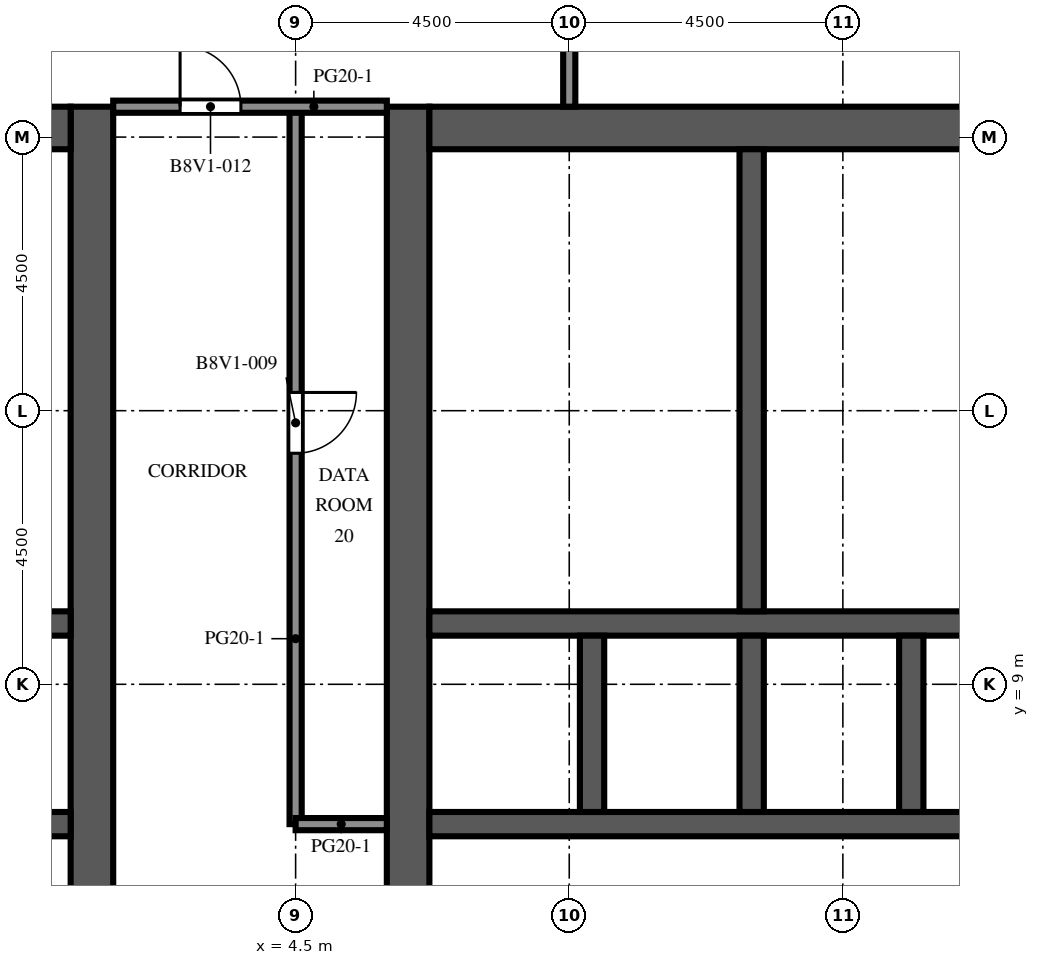
"""IFC4 building model, lengths in metres.
Left out: names, types, materials, properties, quantities, classifications, styles, units other than length and angle.
Written with IfcOpenShell. Run it as: python <this file> out.ifc"""

import sys

from ifc_helpers import new_model, si_unit, direction, frame, frame_2d, origin, place, context, subcontext, project, spatial, rectangle, extrude, element, fill, save


model = new_model("IFC4")
c1 = context("Model", 3, precision=1e-05, world=origin(), true_north=direction((0.0, 1.0)))
c2 = subcontext(c1, "Body", "Model", "MODEL_VIEW")
j1 = project(units=[si_unit("LENGTHUNIT", "METRE"), si_unit("PLANEANGLEUNIT", "RADIAN")], contexts=[c1])
p1 = place(None, origin())
s1 = spatial("IfcSite", under=j1, at=p1, CompositionType="ELEMENT")
p2 = place(p1, origin())
s2 = spatial("IfcBuilding", under=s1, at=p2, CompositionType="ELEMENT")
p3 = place(p2, frame((0.0, 0.0, 278.6)))
s3 = spatial("IfcBuildingStorey", under=s2, at=p3, CompositionType="ELEMENT", Elevation=278.6)
p4 = place(p3, frame((1.15, -9.0, 0.0), z_axis=(0.0, 0.0, 1.0), x_axis=(0.0, 1.0, 0.0)))
e1 = element("IfcWall", 1, at=p4, inside=s3, PredefinedType="SHEAR", context=c2, shape_type="SweptSolid", body=[
    extrude(rectangle(XDim=27.5, YDim=0.7, at=frame_2d((13.75, 0.0))), origin(), (0.0, 0.0, 1.0), 4.1),
])
p5 = place(p4, frame((12.55, 0.0, 0.0)))
e2 = element("IfcOpeningElement", 2, at=p5, cuts=e1, PredefinedType="OPENING", context=c2, shape_type="SweptSolid", body=[
    extrude(rectangle(XDim=2.4, YDim=2.4, at=frame_2d((1.2, 1.2))), frame((0.0, 0.36, 0.0), z_axis=(0.0, -1.0, 0.0), x_axis=(1.0, 0.0, 0.0)), (0.0, 0.0, 1.0), 0.72),
])
p6 = place(p4, frame((3.9, 0.0, 0.0)))
e3 = element("IfcOpeningElement", 3, at=p6, cuts=e1, PredefinedType="OPENING", context=c2, shape_type="SweptSolid", body=[
    extrude(rectangle(XDim=1.2, YDim=2.1, at=frame_2d((0.6, 1.05))), frame((0.0, 0.36, 0.0), z_axis=(0.0, -1.0, 0.0), x_axis=(1.0, 0.0, 0.0)), (0.0, 0.0, 1.0), 0.72),
])
p7 = place(p4, frame((19.46, 0.0, 0.0)))
e4 = element("IfcOpeningElement", 4, at=p7, cuts=e1, PredefinedType="OPENING", context=c2, shape_type="SweptSolid", body=[
    extrude(rectangle(XDim=1.0, YDim=2.1, at=frame_2d((0.5, 1.05))), frame((0.0, 0.36, 0.0), z_axis=(0.0, -1.0, 0.0), x_axis=(1.0, 0.0, 0.0)), (0.0, 0.0, 1.0), 0.72),
])
p8 = place(p4, frame((21.17, 0.0, 0.0)))
e5 = element("IfcOpeningElement", 5, at=p8, cuts=e1, PredefinedType="OPENING", context=c2, shape_type="SweptSolid", body=[
    extrude(rectangle(XDim=1.0, YDim=2.1, at=frame_2d((0.5, 1.05))), frame((0.0, 0.36, 0.0), z_axis=(0.0, -1.0, 0.0), x_axis=(1.0, 0.0, 0.0)), (0.0, 0.0, 1.0), 0.72),
])
p9 = place(p4, frame((23.26, 0.0, 0.0)))
e6 = element("IfcOpeningElement", 6, at=p9, cuts=e1, PredefinedType="OPENING", context=c2, shape_type="SweptSolid", body=[
    extrude(rectangle(XDim=1.0, YDim=2.1, at=frame_2d((0.5, 1.05))), frame((0.0, 0.36, 0.0), z_axis=(0.0, -1.0, 0.0), x_axis=(1.0, 0.0, 0.0)), (0.0, 0.0, 1.0), 0.72),
])
p10 = place(p4, frame((25.35, 0.0, 0.0)))
e7 = element("IfcOpeningElement", 7, at=p10, cuts=e1, PredefinedType="OPENING", context=c2, shape_type="SweptSolid", body=[
    extrude(rectangle(XDim=1.0, YDim=2.1, at=frame_2d((0.5, 1.05))), frame((0.0, 0.36, 0.0), z_axis=(0.0, -1.0, 0.0), x_axis=(1.0, 0.0, 0.0)), (0.0, 0.0, 1.0), 0.72),
])
p11 = place(p3, frame((-9.8, 18.15, 0.0), z_axis=(0.0, 0.0, 1.0), x_axis=(1.0, 0.0, 0.0)))
e8 = element("IfcWall", 8, at=p11, inside=s3, PredefinedType="SHEAR", context=c2, shape_type="SweptSolid", body=[
    extrude(rectangle(XDim=10.6, YDim=0.7, at=frame_2d((5.3, 0.0))), origin(), (0.0, 0.0, 1.0), 4.1),
])
p12 = place(p3, frame((-9.8, 6.7, 0.0), z_axis=(0.0, 0.0, 1.0), x_axis=(1.0, 0.0, 0.0)))
e9 = element("IfcWall", 9, at=p12, inside=s3, PredefinedType="SHEAR", context=c2, shape_type="SweptSolid", body=[
    extrude(rectangle(XDim=10.6, YDim=0.4, at=frame_2d((5.3, 0.0))), origin(), (0.0, 0.0, 1.0), 4.1),
])
p13 = place(p12, frame((3.438, 0.0, 0.0)))
e10 = element("IfcOpeningElement", 10, at=p13, cuts=e9, PredefinedType="OPENING", context=c2, shape_type="SweptSolid", body=[
    extrude(rectangle(XDim=1.1, YDim=2.1, at=frame_2d((0.55, 1.05))), frame((0.0, 0.21, 0.0), z_axis=(0.0, -1.0, 0.0), x_axis=(1.0, 0.0, 0.0)), (0.0, 0.0, 1.0), 0.42),
])
p14 = place(p12, frame((6.062, 0.0, 0.0)))
e11 = element("IfcOpeningElement", 11, at=p14, cuts=e9, PredefinedType="OPENING", context=c2, shape_type="SweptSolid", body=[
    extrude(rectangle(XDim=1.1, YDim=2.1, at=frame_2d((0.55, 1.05))), frame((0.0, 0.21, 0.0), z_axis=(0.0, -1.0, 0.0), x_axis=(1.0, 0.0, 0.0)), (0.0, 0.0, 1.0), 0.42),
])
p15 = place(p12, frame((8.812, 0.0, 0.0)))
e12 = element("IfcOpeningElement", 12, at=p15, cuts=e9, PredefinedType="OPENING", context=c2, shape_type="SweptSolid", body=[
    extrude(rectangle(XDim=1.1, YDim=2.1, at=frame_2d((0.55, 1.05))), frame((0.0, 0.21, 0.0), z_axis=(0.0, -1.0, 0.0), x_axis=(1.0, 0.0, 0.0)), (0.0, 0.0, 1.0), 0.42),
])
p16 = place(p12, frame((0.738, 0.0, 0.0)))
e13 = element("IfcOpeningElement", 13, at=p16, cuts=e9, PredefinedType="OPENING", context=c2, shape_type="SweptSolid", body=[
    extrude(rectangle(XDim=1.0, YDim=2.1, at=frame_2d((0.5, 1.05))), frame((0.0, 0.21, 0.0), z_axis=(0.0, -1.0, 0.0), x_axis=(1.0, 0.0, 0.0)), (0.0, 0.0, 1.0), 0.42),
])
p17 = place(p3, frame((-9.8, 10.0, 0.0), z_axis=(0.0, 0.0, 1.0), x_axis=(1.0, 0.0, 0.0)))
e14 = element("IfcWall", 14, at=p17, inside=s3, PredefinedType="SHEAR", context=c2, shape_type="SweptSolid", body=[
    extrude(rectangle(XDim=10.6, YDim=0.4, at=frame_2d((5.3, 0.0))), origin(), (0.0, 0.0, 1.0), 4.1),
])
p18 = place(p3, frame((6.35, -9.0, 0.0), z_axis=(0.0, 0.0, 1.0), x_axis=(0.0, 1.0, 0.0)))
e15 = element("IfcWall", 15, at=p18, inside=s3, PredefinedType="SHEAR", context=c2, shape_type="SweptSolid", body=[
    extrude(rectangle(XDim=27.5, YDim=0.7, at=frame_2d((13.75, 0.0))), origin(), (0.0, 0.0, 1.0), 4.1),
])
p19 = place(p18, frame((12.55, 0.0, 0.0)))
e16 = element("IfcOpeningElement", 16, at=p19, cuts=e15, PredefinedType="OPENING", context=c2, shape_type="SweptSolid", body=[
    extrude(rectangle(XDim=2.4, YDim=2.4, at=frame_2d((1.2, 1.2))), frame((0.0, 0.36, 0.0), z_axis=(0.0, -1.0, 0.0), x_axis=(1.0, 0.0, 0.0)), (0.0, 0.0, 1.0), 0.72),
])
p20 = place(p18, frame((3.9, 0.0, 0.0)))
e17 = element("IfcOpeningElement", 17, at=p20, cuts=e15, PredefinedType="OPENING", context=c2, shape_type="SweptSolid", body=[
    extrude(rectangle(XDim=1.2, YDim=2.1, at=frame_2d((0.6, 1.05))), frame((0.0, 0.36, 0.0), z_axis=(0.0, -1.0, 0.0), x_axis=(1.0, 0.0, 0.0)), (0.0, 0.0, 1.0), 0.72),
])
p21 = place(p18, frame((19.46, 0.0, 0.0)))
e18 = element("IfcOpeningElement", 18, at=p21, cuts=e15, PredefinedType="OPENING", context=c2, shape_type="SweptSolid", body=[
    extrude(rectangle(XDim=1.0, YDim=2.1, at=frame_2d((0.5, 1.05))), frame((0.0, 0.36, 0.0), z_axis=(0.0, -1.0, 0.0), x_axis=(1.0, 0.0, 0.0)), (0.0, 0.0, 1.0), 0.72),
])
p22 = place(p18, frame((21.17, 0.0, 0.0)))
e19 = element("IfcOpeningElement", 19, at=p22, cuts=e15, PredefinedType="OPENING", context=c2, shape_type="SweptSolid", body=[
    extrude(rectangle(XDim=1.0, YDim=2.1, at=frame_2d((0.5, 1.05))), frame((0.0, 0.36, 0.0), z_axis=(0.0, -1.0, 0.0), x_axis=(1.0, 0.0, 0.0)), (0.0, 0.0, 1.0), 0.72),
])
p23 = place(p18, frame((23.26, 0.0, 0.0)))
e20 = element("IfcOpeningElement", 20, at=p23, cuts=e15, PredefinedType="OPENING", context=c2, shape_type="SweptSolid", body=[
    extrude(rectangle(XDim=1.0, YDim=2.1, at=frame_2d((0.5, 1.05))), frame((0.0, 0.36, 0.0), z_axis=(0.0, -1.0, 0.0), x_axis=(1.0, 0.0, 0.0)), (0.0, 0.0, 1.0), 0.72),
])
p24 = place(p18, frame((25.35, 0.0, 0.0)))
e21 = element("IfcOpeningElement", 21, at=p24, cuts=e15, PredefinedType="OPENING", context=c2, shape_type="SweptSolid", body=[
    extrude(rectangle(XDim=1.0, YDim=2.1, at=frame_2d((0.5, 1.05))), frame((0.0, 0.36, 0.0), z_axis=(0.0, -1.0, 0.0), x_axis=(1.0, 0.0, 0.0)), (0.0, 0.0, 1.0), 0.72),
])
p25 = place(p3, frame((6.7, 18.15, 0.0), z_axis=(0.0, 0.0, 1.0), x_axis=(1.0, 0.0, 0.0)))
e22 = element("IfcWall", 22, at=p25, inside=s3, PredefinedType="SHEAR", context=c2, shape_type="SweptSolid", body=[
    extrude(rectangle(XDim=10.6, YDim=0.7, at=frame_2d((5.3, 0.0))), origin(), (0.0, 0.0, 1.0), 4.1),
])
p26 = place(p3, frame((6.7, 6.7, 0.0), z_axis=(0.0, 0.0, 1.0), x_axis=(1.0, 0.0, 0.0)))
e23 = element("IfcWall", 23, at=p26, inside=s3, PredefinedType="SHEAR", context=c2, shape_type="SweptSolid", body=[
    extrude(rectangle(XDim=10.6, YDim=0.4, at=frame_2d((5.3, 0.0))), origin(), (0.0, 0.0, 1.0), 4.1),
])
p27 = place(p26, frame((3.438, 0.0, 0.0)))
e24 = element("IfcOpeningElement", 24, at=p27, cuts=e23, PredefinedType="OPENING", context=c2, shape_type="SweptSolid", body=[
    extrude(rectangle(XDim=1.1, YDim=2.1, at=frame_2d((0.55, 1.05))), frame((0.0, 0.21, 0.0), z_axis=(0.0, -1.0, 0.0), x_axis=(1.0, 0.0, 0.0)), (0.0, 0.0, 1.0), 0.42),
])
p28 = place(p26, frame((6.062, 0.0, 0.0)))
e25 = element("IfcOpeningElement", 25, at=p28, cuts=e23, PredefinedType="OPENING", context=c2, shape_type="SweptSolid", body=[
    extrude(rectangle(XDim=1.1, YDim=2.1, at=frame_2d((0.55, 1.05))), frame((0.0, 0.21, 0.0), z_axis=(0.0, -1.0, 0.0), x_axis=(1.0, 0.0, 0.0)), (0.0, 0.0, 1.0), 0.42),
])
p29 = place(p26, frame((8.812, 0.0, 0.0)))
e26 = element("IfcOpeningElement", 26, at=p29, cuts=e23, PredefinedType="OPENING", context=c2, shape_type="SweptSolid", body=[
    extrude(rectangle(XDim=1.1, YDim=2.1, at=frame_2d((0.55, 1.05))), frame((0.0, 0.21, 0.0), z_axis=(0.0, -1.0, 0.0), x_axis=(1.0, 0.0, 0.0)), (0.0, 0.0, 1.0), 0.42),
])
p30 = place(p26, frame((0.738, 0.0, 0.0)))
e27 = element("IfcOpeningElement", 27, at=p30, cuts=e23, PredefinedType="OPENING", context=c2, shape_type="SweptSolid", body=[
    extrude(rectangle(XDim=1.0, YDim=2.1, at=frame_2d((0.5, 1.05))), frame((0.0, 0.21, 0.0), z_axis=(0.0, -1.0, 0.0), x_axis=(1.0, 0.0, 0.0)), (0.0, 0.0, 1.0), 0.42),
])
p31 = place(p3, frame((6.7, 10.0, 0.0), z_axis=(0.0, 0.0, 1.0), x_axis=(1.0, 0.0, 0.0)))
e28 = element("IfcWall", 28, at=p31, inside=s3, PredefinedType="SHEAR", context=c2, shape_type="SweptSolid", body=[
    extrude(rectangle(XDim=10.6, YDim=0.4, at=frame_2d((5.3, 0.0))), origin(), (0.0, 0.0, 1.0), 4.1),
])
for number, where, z_axis, x_axis in (
    (29, (9.375, 6.9, 0.0), (0.0, 0.0, 1.0), (0.0, 1.0, 0.0)),
    (30, (12.0, 6.9, 0.0), (0.0, 0.0, 1.0), (0.0, 1.0, 0.0)),
    (31, (14.625, 6.9, 0.0), (0.0, 0.0, 1.0), (0.0, 1.0, 0.0)),
):
    element("IfcWall", number, at=place(p3, frame(where, z_axis=z_axis, x_axis=x_axis)), inside=s3, PredefinedType="SHEAR", context=c2, shape_type="SweptSolid", body=[
        extrude(rectangle(XDim=2.9, YDim=0.4, at=frame_2d((1.45, 0.0))), origin(), (0.0, 0.0, 1.0), 4.1),
    ])
p32 = place(p3, frame((12.0, 10.2, 0.0), z_axis=(0.0, 0.0, 1.0), x_axis=(0.0, 1.0, 0.0)))
e32 = element("IfcWall", 32, at=p32, inside=s3, PredefinedType="SHEAR", context=c2, shape_type="SweptSolid", body=[
    extrude(rectangle(XDim=7.6, YDim=0.4, at=frame_2d((3.8, 0.0))), origin(), (0.0, 0.0, 1.0), 4.1),
])
for number, where, z_axis, x_axis in (
    (33, (-4.3, 11.72, 0.0), (0.0, 0.0, 1.0), (1.0, 0.0, 0.0)),
    (34, (-4.3, 13.62, 0.0), (0.0, 0.0, 1.0), (1.0, 0.0, 0.0)),
    (35, (-4.3, 15.9, 0.0), (0.0, 0.0, 1.0), (1.0, 0.0, 0.0)),
    (36, (6.7, 11.72, 0.0), (0.0, 0.0, 1.0), (1.0, 0.0, 0.0)),
    (37, (6.7, 13.62, 0.0), (0.0, 0.0, 1.0), (1.0, 0.0, 0.0)),
    (38, (6.7, 15.9, 0.0), (0.0, 0.0, 1.0), (1.0, 0.0, 0.0)),
):
    element("IfcWall", number, at=place(p3, frame(where, z_axis=z_axis, x_axis=x_axis)), inside=s3, PredefinedType="PARTITIONING", context=c2, shape_type="SweptSolid", body=[
        extrude(rectangle(XDim=5.1, YDim=0.1, at=frame_2d((2.55, 0.0))), origin(), (0.0, 0.0, 1.0), 3.65),
    ])
p33 = place(p3, frame((4.5, 18.5, 0.0), z_axis=(0.0, 0.0, 1.0), x_axis=(0.0, -1.0, 0.0)))
e39 = element("IfcWall", 39, at=p33, inside=s3, PredefinedType="PARTITIONING", context=c2, shape_type="SweptSolid", body=[
    extrude(rectangle(XDim=11.8, YDim=0.2, at=frame_2d((5.9, 0.0))), origin(), (0.0, 0.0, 1.0), 3.65),
])
p34 = place(p33, frame((4.7, 0.0, 0.0)))
e40 = element("IfcOpeningElement", 40, at=p34, cuts=e39, PredefinedType="OPENING", context=c2, shape_type="SweptSolid", body=[
    extrude(rectangle(XDim=1.0, YDim=2.1, at=frame_2d((0.5, 1.05))), frame((0.0, 0.11, 0.0), z_axis=(0.0, -1.0, 0.0), x_axis=(1.0, 0.0, 0.0)), (0.0, 0.0, 1.0), 0.22),
])
p35 = place(p3, frame((9.0, 18.5, 0.0), z_axis=(0.0, 0.0, 1.0), x_axis=(0.0, 1.0, 0.0)))
e41 = element("IfcWall", 41, at=p35, inside=s3, PredefinedType="PARTITIONING", context=c2, shape_type="SweptSolid", body=[
    extrude(rectangle(XDim=3.5, YDim=0.2, at=frame_2d((1.75, 0.0))), origin(), (0.0, 0.0, 1.0), 3.65),
])
p36 = place(p3, frame((4.5, 6.7, 0.0), z_axis=(0.0, 0.0, 1.0), x_axis=(1.0, 0.0, 0.0)))
e42 = element("IfcWall", 42, at=p36, inside=s3, PredefinedType="PARTITIONING", context=c2, shape_type="SweptSolid", body=[
    extrude(rectangle(XDim=1.5, YDim=0.2, at=frame_2d((0.75, 0.0))), origin(), (0.0, 0.0, 1.0), 3.65),
])
p37 = place(p3, frame((1.5, 18.5, 0.0), z_axis=(0.0, 0.0, 1.0), x_axis=(1.0, 0.0, 0.0)))
e43 = element("IfcWall", 43, at=p37, inside=s3, PredefinedType="PARTITIONING", context=c2, shape_type="SweptSolid", body=[
    extrude(rectangle(XDim=4.5, YDim=0.2, at=frame_2d((2.25, 0.0))), origin(), (0.0, 0.0, 1.0), 3.65),
])
p38 = place(p37, frame((1.1, 0.0, 0.0)))
e44 = element("IfcOpeningElement", 44, at=p38, cuts=e43, PredefinedType="OPENING", context=c2, shape_type="SweptSolid", body=[
    extrude(rectangle(XDim=1.0, YDim=2.1, at=frame_2d((0.5, 1.05))), frame((0.0, 0.11, 0.0), z_axis=(0.0, -1.0, 0.0), x_axis=(1.0, 0.0, 0.0)), (0.0, 0.0, 1.0), 0.22),
])
p39 = place(p27, origin())
e45 = element("IfcDoor", 45, at=p39, inside=s3, OperationType="DOUBLE_DOOR_SLIDING", PredefinedType="DOOR", context=c2, shape_type="SweptSolid", body=[
    extrude(rectangle(XDim=1.1, YDim=2.1, at=frame_2d((0.55, 1.05))), frame((0.0, 0.025, 0.0), z_axis=(0.0, -1.0, 0.0), x_axis=(1.0, 0.0, 0.0)), (0.0, 0.0, 1.0), 0.05),
])
fill(e24, e45)
p40 = place(p28, origin())
e46 = element("IfcDoor", 46, at=p40, inside=s3, OperationType="DOUBLE_DOOR_SLIDING", PredefinedType="DOOR", context=c2, shape_type="SweptSolid", body=[
    extrude(rectangle(XDim=1.1, YDim=2.1, at=frame_2d((0.55, 1.05))), frame((0.0, 0.025, 0.0), z_axis=(0.0, -1.0, 0.0), x_axis=(1.0, 0.0, 0.0)), (0.0, 0.0, 1.0), 0.05),
])
fill(e25, e46)
p41 = place(p5, origin())
e47 = element("IfcDoor", 47, at=p41, inside=s3, OperationType="DOUBLE_DOOR_DOUBLE_SWING", PredefinedType="DOOR", context=c2, shape_type="SweptSolid", body=[
    extrude(rectangle(XDim=2.4, YDim=2.4, at=frame_2d((1.2, 1.2))), frame((0.0, 0.025, 0.0), z_axis=(0.0, -1.0, 0.0), x_axis=(1.0, 0.0, 0.0)), (0.0, 0.0, 1.0), 0.05),
])
fill(e2, e47)
p42 = place(p19, origin())
e48 = element("IfcDoor", 48, at=p42, inside=s3, OperationType="DOUBLE_DOOR_DOUBLE_SWING", PredefinedType="DOOR", context=c2, shape_type="SweptSolid", body=[
    extrude(rectangle(XDim=2.4, YDim=2.4, at=frame_2d((1.2, 1.2))), frame((0.0, 0.025, 0.0), z_axis=(0.0, -1.0, 0.0), x_axis=(1.0, 0.0, 0.0)), (0.0, 0.0, 1.0), 0.05),
])
fill(e16, e48)
p43 = place(p7, origin())
e49 = element("IfcDoor", 49, at=p43, inside=s3, OperationType="SINGLE_SWING_LEFT", PredefinedType="DOOR", context=c2, shape_type="SweptSolid", body=[
    extrude(rectangle(XDim=1.0, YDim=2.1, at=frame_2d((0.5, 1.05))), frame((0.0, 0.325, 0.0), z_axis=(0.0, -1.0, 0.0), x_axis=(1.0, 0.0, 0.0)), (0.0, 0.0, 1.0), 0.05),
])
fill(e4, e49)
p44 = place(p8, origin())
e50 = element("IfcDoor", 50, at=p44, inside=s3, OperationType="SINGLE_SWING_RIGHT", PredefinedType="DOOR", context=c2, shape_type="SweptSolid", body=[
    extrude(rectangle(XDim=1.0, YDim=2.1, at=frame_2d((0.5, 1.05))), frame((0.0, 0.325, 0.0), z_axis=(0.0, -1.0, 0.0), x_axis=(1.0, 0.0, 0.0)), (0.0, 0.0, 1.0), 0.05),
])
fill(e5, e50)
p45 = place(p9, origin())
e51 = element("IfcDoor", 51, at=p45, inside=s3, OperationType="SINGLE_SWING_LEFT", PredefinedType="DOOR", context=c2, shape_type="SweptSolid", body=[
    extrude(rectangle(XDim=1.0, YDim=2.1, at=frame_2d((0.5, 1.05))), frame((0.0, 0.325, 0.0), z_axis=(0.0, -1.0, 0.0), x_axis=(1.0, 0.0, 0.0)), (0.0, 0.0, 1.0), 0.05),
])
fill(e6, e51)
p46 = place(p10, origin())
e52 = element("IfcDoor", 52, at=p46, inside=s3, OperationType="SINGLE_SWING_RIGHT", PredefinedType="DOOR", context=c2, shape_type="SweptSolid", body=[
    extrude(rectangle(XDim=1.0, YDim=2.1, at=frame_2d((0.5, 1.05))), frame((0.0, 0.325, 0.0), z_axis=(0.0, -1.0, 0.0), x_axis=(1.0, 0.0, 0.0)), (0.0, 0.0, 1.0), 0.05),
])
fill(e7, e52)
p47 = place(p30, origin())
e53 = element("IfcDoor", 53, at=p47, inside=s3, OperationType="SINGLE_SWING_LEFT", PredefinedType="DOOR", context=c2, shape_type="SweptSolid", body=[
    extrude(rectangle(XDim=1.0, YDim=2.1, at=frame_2d((0.5, 1.05))), frame((0.0, 0.025, 0.0), z_axis=(0.0, -1.0, 0.0), x_axis=(1.0, 0.0, 0.0)), (0.0, 0.0, 1.0), 0.05),
])
fill(e27, e53)
p48 = place(p21, origin())
e54 = element("IfcDoor", 54, at=p48, inside=s3, OperationType="SINGLE_SWING_RIGHT", PredefinedType="DOOR", context=c2, shape_type="SweptSolid", body=[
    extrude(rectangle(XDim=1.0, YDim=2.1, at=frame_2d((0.5, 1.05))), frame((0.0, -0.275, 0.0), z_axis=(0.0, -1.0, 0.0), x_axis=(1.0, 0.0, 0.0)), (0.0, 0.0, 1.0), 0.05),
])
fill(e18, e54)
p49 = place(p22, origin())
e55 = element("IfcDoor", 55, at=p49, inside=s3, OperationType="SINGLE_SWING_LEFT", PredefinedType="DOOR", context=c2, shape_type="SweptSolid", body=[
    extrude(rectangle(XDim=1.0, YDim=2.1, at=frame_2d((0.5, 1.05))), frame((0.0, -0.275, 0.0), z_axis=(0.0, -1.0, 0.0), x_axis=(1.0, 0.0, 0.0)), (0.0, 0.0, 1.0), 0.05),
])
fill(e19, e55)
p50 = place(p23, origin())
e56 = element("IfcDoor", 56, at=p50, inside=s3, OperationType="SINGLE_SWING_RIGHT", PredefinedType="DOOR", context=c2, shape_type="SweptSolid", body=[
    extrude(rectangle(XDim=1.0, YDim=2.1, at=frame_2d((0.5, 1.05))), frame((0.0, -0.275, 0.0), z_axis=(0.0, -1.0, 0.0), x_axis=(1.0, 0.0, 0.0)), (0.0, 0.0, 1.0), 0.05),
])
fill(e20, e56)
p51 = place(p24, origin())
e57 = element("IfcDoor", 57, at=p51, inside=s3, OperationType="SINGLE_SWING_LEFT", PredefinedType="DOOR", context=c2, shape_type="SweptSolid", body=[
    extrude(rectangle(XDim=1.0, YDim=2.1, at=frame_2d((0.5, 1.05))), frame((0.0, -0.275, 0.0), z_axis=(0.0, -1.0, 0.0), x_axis=(1.0, 0.0, 0.0)), (0.0, 0.0, 1.0), 0.05),
])
fill(e21, e57)
p52 = place(p34, origin())
e58 = element("IfcDoor", 58, at=p52, inside=s3, OperationType="SINGLE_SWING_LEFT", PredefinedType="DOOR", context=c2, shape_type="SweptSolid", body=[
    extrude(rectangle(XDim=1.0, YDim=2.1, at=frame_2d((0.5, 1.05))), frame((0.0, 0.025, 0.0), z_axis=(0.0, -1.0, 0.0), x_axis=(1.0, 0.0, 0.0)), (0.0, 0.0, 1.0), 0.05),
])
fill(e40, e58)
p53 = place(p38, origin())
e59 = element("IfcDoor", 59, at=p53, inside=s3, OperationType="SINGLE_SWING_LEFT", PredefinedType="DOOR", context=c2, shape_type="SweptSolid", body=[
    extrude(rectangle(XDim=1.0, YDim=2.1, at=frame_2d((0.5, 1.05))), frame((0.0, 0.025, 0.0), z_axis=(0.0, -1.0, 0.0), x_axis=(1.0, 0.0, 0.0)), (0.0, 0.0, 1.0), 0.05),
])
fill(e44, e59)
save(model, sys.argv[1])
